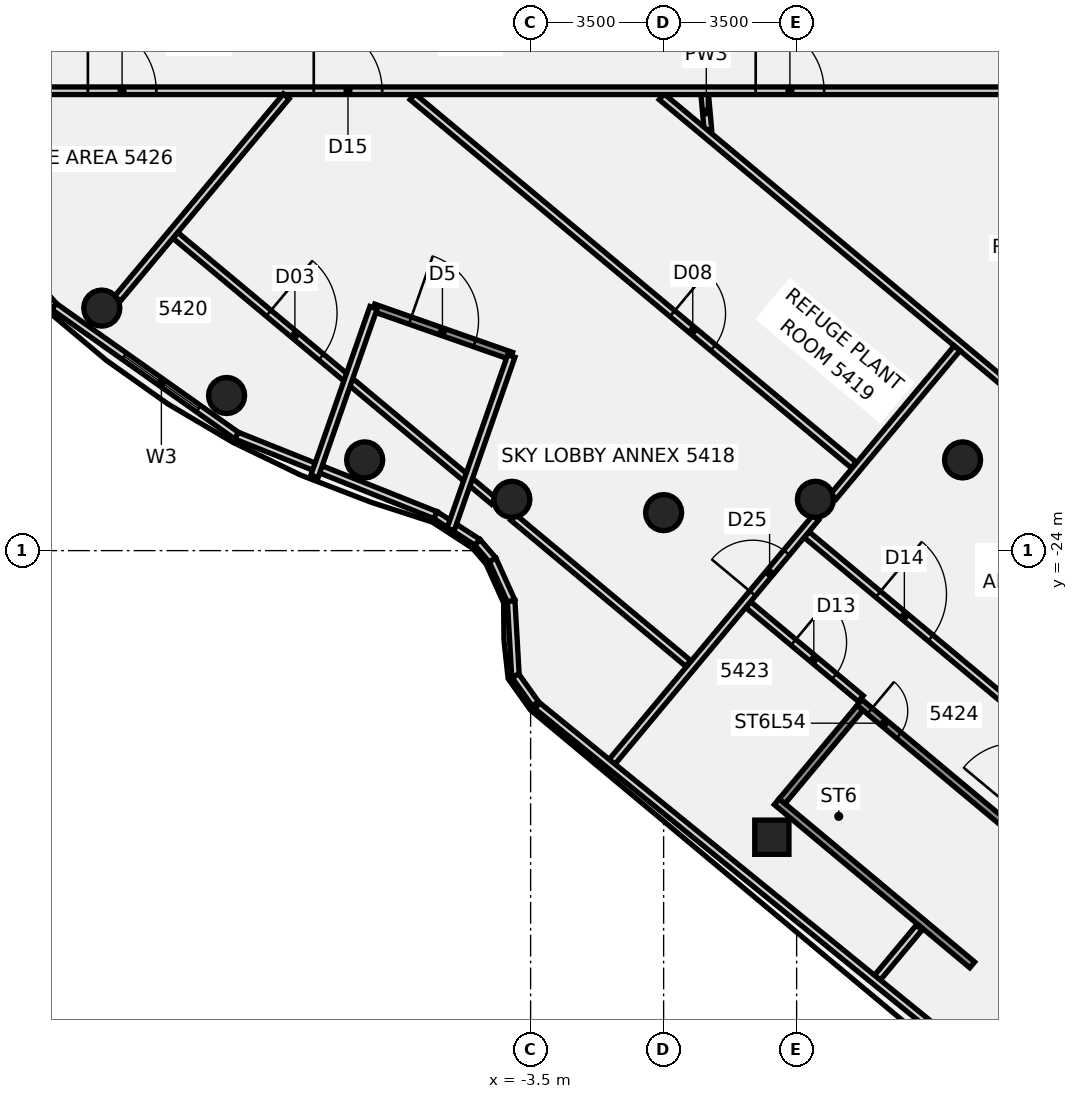
"""IFC4 building model, lengths in metres.
Left out: names, types, materials, properties, quantities, classifications, styles, units other than length and angle.
Written with IfcOpenShell. Run it as: python <this file> out.ifc"""

import sys

from ifc_helpers import new_model, si_unit, direction, frame, frame_2d, origin, origin_2d, place, context, subcontext, project, spatial, polyline, rectangle, circle, outline, extrude, element, fill, save


model = new_model("IFC4")
c1 = context("Model", 3, precision=1e-05, world=origin(), true_north=direction((0.0, 1.0)))
c2 = subcontext(c1, "Body", "Model", "MODEL_VIEW")
j1 = project(units=[si_unit("LENGTHUNIT", "METRE"), si_unit("PLANEANGLEUNIT", "RADIAN")], contexts=[c1])
p1 = place(None, origin())
s1 = spatial("IfcSite", under=j1, at=p1, CompositionType="ELEMENT")
p2 = place(p1, origin())
s2 = spatial("IfcBuilding", under=s1, at=p2, CompositionType="ELEMENT")
p3 = place(p2, frame((0.0, 0.0, 214.9)))
s3 = spatial("IfcBuildingStorey", under=s2, at=p3, CompositionType="ELEMENT", Elevation=214.9)
for number, where, z_axis, x_axis in (
    (1, (-14.784, -17.619, -0.18), (0.0, 0.0, 1.0), (1.0, 0.0, 0.0)),
    (2, (-11.5, -19.919, -0.18), (0.0, 0.0, 1.0), (1.0, 0.0, 0.0)),
    (3, (-7.866, -21.613, -0.18), (0.0, 0.0, 1.0), (1.0, 0.0, 0.0)),
    (4, (-3.994, -22.651, -0.18), (0.0, 0.0, 1.0), (1.0, 0.0, 0.0)),
    (5, (0.0, -23.0, -0.18), (0.0, 0.0, 1.0), (1.0, 0.0, 0.0)),
    (6, (3.994, -22.651, -0.18), (0.0, 0.0, 1.0), (1.0, 0.0, 0.0)),
    (7, (7.866, -21.613, -0.18), (0.0, 0.0, 1.0), (1.0, 0.0, 0.0)),
):
    element("IfcColumn", number, at=place(p3, frame(where, z_axis=z_axis, x_axis=x_axis)), inside=s3, PredefinedType="COLUMN", context=c2, shape_type="SweptSolid", body=[
        extrude(circle(Radius=0.475, at=origin_2d()), origin(), (0.0, 0.0, 1.0), 5.04),
    ])
p4 = place(p3, frame((2.848, -31.541, -0.163), z_axis=(0.0, 0.0, 1.0), x_axis=(0.640774549773, 0.767729103501, 0.0)))
e8 = element("IfcColumn", 8, at=p4, inside=s3, PredefinedType="COLUMN", context=c2, shape_type="SweptSolid", body=[
    extrude(rectangle(XDim=0.9, YDim=0.9, at=origin_2d()), origin(), (0.0, 0.0, 1.0), 4.913),
])
p5 = place(p3, frame((1.081, -11.99, 0.0), z_axis=(0.0, 0.0, 1.0), x_axis=(0.089106826203, -0.996022074818, 0.0)))
e9 = element("IfcWall", 9, at=p5, inside=s3, PredefinedType="PARTITIONING", context=c2, shape_type="SweptSolid", body=[
    extrude(rectangle(XDim=0.94, YDim=0.2, at=frame_2d((0.47, 0.0))), origin(), (0.0, 0.0, 1.0), 4.16),
])
p6 = place(p3, frame((-12.85, -15.703, 0.0), z_axis=(0.0, 0.0, 1.0), x_axis=(0.767726330183, -0.640777872545, 0.0)))
e10 = element("IfcWall", 10, at=p6, inside=s3, PredefinedType="PARTITIONING", context=c2, shape_type="SweptSolid", body=[
    extrude(rectangle(XDim=10.922, YDim=0.2, at=frame_2d((5.461, 0.0))), origin(), (0.0, 0.0, 1.0), 4.16),
])
p7 = place(p6, frame((3.2, 0.0, 0.0)))
e11 = element("IfcOpeningElement", 11, at=p7, cuts=e10, PredefinedType="OPENING", context=c2, shape_type="SweptSolid", body=[
    extrude(rectangle(XDim=1.8, YDim=2.1, at=frame_2d((0.9, 1.05))), frame((0.0, 0.11, 0.0), z_axis=(0.0, -1.0, 0.0), x_axis=(1.0, 0.0, 0.0)), (0.0, 0.0, 1.0), 0.22),
])
p8 = place(p3, frame((-3.957, -23.126, 0.0), z_axis=(0.0, 0.0, 1.0), x_axis=(0.76774384471, -0.640756887524, 0.0)))
e12 = element("IfcWall", 12, at=p8, inside=s3, PredefinedType="PARTITIONING", context=c2, shape_type="SweptSolid", body=[
    extrude(rectangle(XDim=5.997, YDim=0.2, at=frame_2d((2.998, 0.0))), origin(), (0.0, 0.0, 1.0), 4.16),
])
p9 = place(p3, frame((-6.607, -12.057, 0.0), z_axis=(0.0, 0.0, 1.0), x_axis=(0.767718234812, -0.640787571615, 0.0)))
e13 = element("IfcWall", 13, at=p9, inside=s3, PredefinedType="PARTITIONING", context=c2, shape_type="SweptSolid", body=[
    extrude(rectangle(XDim=15.124, YDim=0.2, at=frame_2d((7.562, 0.0))), origin(), (0.0, 0.0, 1.0), 4.16),
])
p10 = place(p9, frame((8.905, 0.0, 0.0)))
e14 = element("IfcOpeningElement", 14, at=p10, cuts=e13, PredefinedType="OPENING", context=c2, shape_type="SweptSolid", body=[
    extrude(rectangle(XDim=1.4, YDim=2.1, at=frame_2d((0.7, 1.05))), frame((0.0, 0.11, 0.0), z_axis=(0.0, -1.0, 0.0), x_axis=(1.0, 0.0, 0.0)), (0.0, 0.0, 1.0), 0.22),
])
p11 = place(p3, frame((-0.052, -12.057, 0.0), z_axis=(0.0, 0.0, 1.0), x_axis=(0.767705248062, -0.64080313053, 0.0)))
e15 = element("IfcWall", 15, at=p11, inside=s3, PredefinedType="PARTITIONING", context=c2, shape_type="SweptSolid", body=[
    extrude(rectangle(XDim=16.257, YDim=0.2, at=frame_2d((8.128, 0.0))), origin(), (0.0, 0.0, 1.0), 4.16),
])
p12 = place(p3, frame((2.225, -25.42, 0.0), z_axis=(0.0, 0.0, 1.0), x_axis=(0.767749314301, -0.640750333898, 0.0)))
e16 = element("IfcWall", 16, at=p12, inside=s3, PredefinedType="PARTITIONING", context=c2, shape_type="SweptSolid", body=[
    extrude(rectangle(XDim=3.86, YDim=0.2, at=frame_2d((1.93, 0.0))), origin(), (0.0, 0.0, 1.0), 4.05),
])
p13 = place(p12, frame((1.55, 0.0, 0.0)))
e17 = element("IfcOpeningElement", 17, at=p13, cuts=e16, PredefinedType="OPENING", context=c2, shape_type="SweptSolid", body=[
    extrude(rectangle(XDim=1.4, YDim=2.1, at=frame_2d((0.7, 1.05))), frame((0.0, 0.11, 0.0), z_axis=(0.0, -1.0, 0.0), x_axis=(1.0, 0.0, 0.0)), (0.0, 0.0, 1.0), 0.22),
])
p14 = place(p3, frame((3.763, -23.578, 0.0), z_axis=(0.0, 0.0, 1.0), x_axis=(0.767756138221, -0.640742157365, 0.0)))
e18 = element("IfcWall", 18, at=p14, inside=s3, PredefinedType="PARTITIONING", context=c2, shape_type="SweptSolid", body=[
    extrude(rectangle(XDim=8.781, YDim=0.2, at=frame_2d((4.39, 0.0))), origin(), (0.0, 0.0, 1.0), 4.05),
])
p15 = place(p14, frame((2.45, 0.0, 0.0)))
e19 = element("IfcOpeningElement", 19, at=p15, cuts=e18, PredefinedType="OPENING", context=c2, shape_type="SweptSolid", body=[
    extrude(rectangle(XDim=1.8, YDim=2.1, at=frame_2d((0.9, 1.05))), frame((0.0, 0.11, 0.0), z_axis=(0.0, -1.0, 0.0), x_axis=(1.0, 0.0, 0.0)), (0.0, 0.0, 1.0), 0.22),
])
p16 = place(p3, frame((-17.1, -11.9, 0.0), z_axis=(0.0, 0.0, 1.0), x_axis=(1.0, 0.0, 0.0)))
e20 = element("IfcWall", 20, at=p16, inside=s3, PredefinedType="PARTITIONING", context=c2, shape_type="SweptSolid", body=[
    extrude(rectangle(XDim=34.145, YDim=0.2, at=frame_2d((17.073, 0.0))), origin(), (0.0, 0.0, 1.0), 4.16),
])
p17 = place(p16, frame((7.894, 0.0, 0.0)))
e21 = element("IfcOpeningElement", 21, at=p17, cuts=e20, PredefinedType="OPENING", context=c2, shape_type="SweptSolid", body=[
    extrude(rectangle(XDim=1.8, YDim=2.1, at=frame_2d((0.9, 1.05))), frame((0.0, 0.11, 0.0), z_axis=(0.0, -1.0, 0.0), x_axis=(1.0, 0.0, 0.0)), (0.0, 0.0, 1.0), 0.22),
])
p18 = place(p16, frame((1.95, 0.0, 0.0)))
e22 = element("IfcOpeningElement", 22, at=p18, cuts=e20, PredefinedType="OPENING", context=c2, shape_type="SweptSolid", body=[
    extrude(rectangle(XDim=1.8, YDim=2.1, at=frame_2d((0.9, 1.05))), frame((0.0, 0.11, 0.0), z_axis=(0.0, -1.0, 0.0), x_axis=(1.0, 0.0, 0.0)), (0.0, 0.0, 1.0), 0.22),
])
p19 = place(p16, frame((19.523, 0.0, 0.0)))
e23 = element("IfcOpeningElement", 23, at=p19, cuts=e20, PredefinedType="OPENING", context=c2, shape_type="SweptSolid", body=[
    extrude(rectangle(XDim=1.8, YDim=2.1, at=frame_2d((0.9, 1.05))), frame((0.0, 0.11, 0.0), z_axis=(0.0, -1.0, 0.0), x_axis=(1.0, 0.0, 0.0)), (0.0, 0.0, 1.0), 0.22),
])
p20 = place(p3, frame((-14.371, -17.37, 0.0), z_axis=(0.0, 0.0, 1.0), x_axis=(0.640582551282, 0.76788931168, 0.0)))
e24 = element("IfcWall", 24, at=p20, inside=s3, PredefinedType="PARTITIONING", context=c2, shape_type="SweptSolid", body=[
    extrude(rectangle(XDim=6.935, YDim=0.2, at=frame_2d((3.467, 0.0))), origin(), (0.0, 0.0, 1.0), 4.16),
])
p21 = place(p3, frame((-1.375, -29.578, 0.0), z_axis=(0.0, 0.0, 1.0), x_axis=(0.6407249457, 0.767770502141, 0.0)))
e25 = element("IfcWall", 25, at=p21, inside=s3, PredefinedType="PARTITIONING", context=c2, shape_type="SweptSolid", body=[
    extrude(rectangle(XDim=8.394, YDim=0.2, at=frame_2d((4.197, 0.0))), origin(), (0.0, 0.0, 1.0), 4.15),
])
p22 = place(p21, frame((5.799, 0.0, 0.0)))
e26 = element("IfcOpeningElement", 26, at=p22, cuts=e25, PredefinedType="OPENING", context=c2, shape_type="SweptSolid", body=[
    extrude(rectangle(XDim=1.4, YDim=2.1, at=frame_2d((0.7, 1.05))), frame((0.0, 0.11, 0.0), z_axis=(0.0, -1.0, 0.0), x_axis=(1.0, 0.0, 0.0)), (0.0, 0.0, 1.0), 0.22),
])
p23 = place(p3, frame((4.461, -22.584, 0.0), z_axis=(0.0, 0.0, 1.0), x_axis=(0.640712685958, 0.767780733057, 0.0)))
e27 = element("IfcWall", 27, at=p23, inside=s3, PredefinedType="PARTITIONING", context=c2, shape_type="SweptSolid", body=[
    extrude(rectangle(XDim=5.09, YDim=0.2, at=frame_2d((2.545, 0.0))), origin(), (0.0, 0.0, 1.0), 4.16),
])
p24 = place(p3, frame((5.535, -35.345, 0.0), z_axis=(0.0, 0.0, 1.0), x_axis=(0.640455669919, 0.767995139873, 0.0)))
e28 = element("IfcWall", 28, at=p24, inside=s3, PredefinedType="PARTITIONING", context=c2, shape_type="SweptSolid", body=[
    extrude(rectangle(XDim=1.859, YDim=0.2, at=frame_2d((0.929, 0.0))), origin(), (0.0, 0.0, 1.0), 4.15),
])
p25 = place(p3, frame((-19.328, -13.853, 0.0), z_axis=(0.0, 0.0, 1.0), x_axis=(0.661797193019, -0.749682916513, 0.0)))
e29 = element("IfcWall", 29, at=p25, inside=s3, PredefinedType="SOLIDWALL", context=c2, shape_type="SweptSolid", body=[
    extrude(rectangle(XDim=4.967, YDim=0.2, at=frame_2d((2.483, 0.0))), origin(), (0.0, 0.0, 1.0), 4.86),
])
p26 = place(p25, frame((2.05, 0.0, 1.4)))
e30 = element("IfcOpeningElement", 30, at=p26, cuts=e29, PredefinedType="OPENING", context=c2, shape_type="SweptSolid", body=[
    extrude(rectangle(XDim=2.4, YDim=2.1, at=frame_2d((1.2, 1.05))), frame((0.0, 0.11, 0.0), z_axis=(0.0, -1.0, 0.0), x_axis=(1.0, 0.0, 0.0)), (0.0, 0.0, 1.0), 0.22),
])
p27 = place(p3, frame((-16.041, -17.576, 0.0), z_axis=(0.0, 0.0, 1.0), x_axis=(0.816353639148, -0.577552366327, 0.0)))
e31 = element("IfcWall", 31, at=p27, inside=s3, PredefinedType="SOLIDWALL", context=c2, shape_type="SweptSolid", body=[
    extrude(rectangle(XDim=5.887, YDim=0.2, at=frame_2d((2.943, 0.0))), origin(), (0.0, 0.0, 1.0), 4.86),
])
p28 = place(p27, frame((2.26, 0.0, 1.4)))
e32 = element("IfcOpeningElement", 32, at=p28, cuts=e31, PredefinedType="OPENING", context=c2, shape_type="SweptSolid", body=[
    extrude(rectangle(XDim=2.4, YDim=2.1, at=frame_2d((1.2, 1.05))), frame((0.0, 0.11, 0.0), z_axis=(0.0, -1.0, 0.0), x_axis=(1.0, 0.0, 0.0)), (0.0, 0.0, 1.0), 0.22),
])
p29 = place(p3, frame((-11.235, -20.976, 0.0), z_axis=(0.0, 0.0, 1.0), x_axis=(0.928649853496, -0.370957476811, 0.0)))
e33 = element("IfcWall", 33, at=p29, inside=s3, PredefinedType="SOLIDWALL", context=c2, shape_type="SweptSolid", body=[
    extrude(rectangle(XDim=5.636, YDim=0.2, at=frame_2d((2.818, 0.0))), origin(), (0.0, 0.0, 1.0), 4.86),
])
p30 = place(p3, frame((-6.001, -23.067, 0.0), z_axis=(0.0, 0.0, 1.0), x_axis=(0.839116919662, -0.543951096274, 0.0)))
e34 = element("IfcWall", 34, at=p30, inside=s3, PredefinedType="SOLIDWALL", context=c2, shape_type="SweptSolid", body=[
    extrude(rectangle(XDim=1.316, YDim=0.2, at=frame_2d((0.658, 0.0))), origin(), (0.0, 0.0, 1.0), 4.86),
])
p31 = place(p3, frame((-4.897, -23.783, 0.0), z_axis=(0.0, 0.0, 1.0), x_axis=(0.651417628254, -0.758719364192, 0.0)))
e35 = element("IfcWall", 35, at=p31, inside=s3, PredefinedType="SOLIDWALL", context=c2, shape_type="SweptSolid", body=[
    extrude(rectangle(XDim=0.61, YDim=0.2, at=frame_2d((0.305, 0.0))), origin(), (0.0, 0.0, 1.0), 4.86),
])
p32 = place(p3, frame((-4.5, -24.246, 0.0), z_axis=(0.0, 0.0, 1.0), x_axis=(0.411322207494, -0.911490011806, 0.0)))
e36 = element("IfcWall", 36, at=p32, inside=s3, PredefinedType="SOLIDWALL", context=c2, shape_type="SweptSolid", body=[
    extrude(rectangle(XDim=1.187, YDim=0.2, at=frame_2d((0.594, 0.0))), origin(), (0.0, 0.0, 1.0), 4.86),
])
p33 = place(p3, frame((-4.011, -25.328, 0.0), z_axis=(0.0, 0.0, 1.0), x_axis=(0.057109766027, -0.998367905446, 0.0)))
e37 = element("IfcWall", 37, at=p33, inside=s3, PredefinedType="SOLIDWALL", context=c2, shape_type="SweptSolid", body=[
    extrude(rectangle(XDim=1.971, YDim=0.2, at=frame_2d((0.985, 0.0))), origin(), (0.0, 0.0, 1.0), 4.86),
])
p34 = place(p3, frame((-3.899, -27.295, 0.0), z_axis=(0.0, 0.0, 1.0), x_axis=(0.580599391883, -0.814189379779, 0.0)))
e38 = element("IfcWall", 38, at=p34, inside=s3, PredefinedType="SOLIDWALL", context=c2, shape_type="SweptSolid", body=[
    extrude(rectangle(XDim=0.904, YDim=0.2, at=frame_2d((0.452, 0.0))), origin(), (0.0, 0.0, 1.0), 4.86),
])
p35 = place(p3, frame((-3.326, -28.081, 0.0), z_axis=(0.0, 0.0, 1.0), x_axis=(0.775707462679, -0.631092649572, 0.0)))
e39 = element("IfcWall", 39, at=p35, inside=s3, PredefinedType="SOLIDWALL", context=c2, shape_type="SweptSolid", body=[
    extrude(rectangle(XDim=19.7, YDim=0.2, at=frame_2d((9.85, 0.0))), origin(), (0.0, 0.0, 1.0), 4.86),
])
p36 = place(p35, frame((17.1, 0.0, 1.4)))
e40 = element("IfcOpeningElement", 40, at=p36, cuts=e39, PredefinedType="OPENING", context=c2, shape_type="SweptSolid", body=[
    extrude(rectangle(XDim=2.4, YDim=2.1, at=frame_2d((1.2, 1.05))), frame((0.0, 0.11, 0.0), z_axis=(0.0, -1.0, 0.0), x_axis=(1.0, 0.0, 0.0)), (0.0, 0.0, 1.0), 0.22),
])
p37 = place(p3, frame((-7.634, -17.608, 0.0), z_axis=(0.0, 0.0, 1.0), x_axis=(0.943849439762, -0.330375899638, 0.0)))
e41 = element("IfcWall", 41, at=p37, inside=s3, PredefinedType="SOLIDWALL", context=c2, shape_type="SweptSolid", body=[
    extrude(rectangle(XDim=3.842, YDim=0.2, at=frame_2d((1.921, 0.0))), origin(), (0.0, 0.0, 1.0), 4.364),
])
p38 = place(p37, frame((1.021, 0.0, 0.0)))
e42 = element("IfcOpeningElement", 42, at=p38, cuts=e41, PredefinedType="OPENING", context=c2, shape_type="SweptSolid", body=[
    extrude(rectangle(XDim=1.8, YDim=2.4, at=frame_2d((0.9, 1.2))), frame((0.0, 0.11, 0.0), z_axis=(0.0, -1.0, 0.0), x_axis=(1.0, 0.0, 0.0)), (0.0, 0.0, 1.0), 0.22),
])
p39 = place(p3, frame((-7.634, -17.608, 0.0), z_axis=(0.0, 0.0, 1.0), x_axis=(-0.330366613527, -0.943852690131, 0.0)))
e43 = element("IfcWall", 43, at=p39, inside=s3, PredefinedType="SOLIDWALL", context=c2, shape_type="SweptSolid", body=[
    extrude(rectangle(XDim=4.702, YDim=0.2, at=frame_2d((2.351, 0.0))), origin(), (0.0, 0.0, 1.0), 4.86),
])
p40 = place(p3, frame((-4.007, -18.878, 0.0), z_axis=(0.0, 0.0, 1.0), x_axis=(-0.330357165554, -0.94385599705, 0.0)))
e44 = element("IfcWall", 44, at=p40, inside=s3, PredefinedType="SOLIDWALL", context=c2, shape_type="SweptSolid", body=[
    extrude(rectangle(XDim=4.84, YDim=0.2, at=frame_2d((2.42, 0.0))), origin(), (0.0, 0.0, 1.0), 4.364),
])
p41 = place(p3, frame((5.155, -27.996, -0.18), z_axis=(0.0, 0.0, 1.0), x_axis=(0.767728232678, -0.640775593129, 0.0)))
e45 = element("IfcWall", 45, at=p41, inside=s3, PredefinedType="SHEAR", context=c2, shape_type="SweptSolid", body=[
    extrude(rectangle(XDim=6.7, YDim=0.2, at=frame_2d((3.35, 0.0))), origin(), (0.0, 0.0, 1.0), 4.23),
])
p42 = place(p41, frame((0.35, 0.0, 0.0)))
e46 = element("IfcOpeningElement", 46, at=p42, cuts=e45, PredefinedType="OPENING", context=c2, shape_type="SweptSolid", body=[
    extrude(rectangle(XDim=1.0, YDim=2.1, at=frame_2d((0.5, 1.05))), frame((0.0, 0.11, 0.0), z_axis=(0.0, -1.0, 0.0), x_axis=(1.0, 0.0, 0.0)), (0.0, 0.0, 1.0), 0.22),
])
p43 = place(p3, frame((2.977, -30.606, -0.18), z_axis=(0.0, 0.0, 1.0), x_axis=(0.767728232678, -0.640775593129, 0.0)))
e47 = element("IfcWall", 47, at=p43, inside=s3, PredefinedType="SHEAR", context=c2, shape_type="SweptSolid", body=[
    extrude(rectangle(XDim=6.7, YDim=0.2, at=frame_2d((3.35, 0.0))), origin(), (0.0, 0.0, 1.0), 4.23),
])
p44 = place(p3, frame((3.117, -30.594, -0.18), z_axis=(0.0, 0.0, 1.0), x_axis=(0.640777035898, 0.767727028485, 0.0)))
e48 = element("IfcWall", 48, at=p44, inside=s3, PredefinedType="SHEAR", context=c2, shape_type="SweptSolid", body=[
    extrude(rectangle(XDim=3.2, YDim=0.2, at=frame_2d((1.6, 0.0))), origin(), (0.0, 0.0, 1.0), 4.23),
])
p45 = place(p3, frame((0.0, 0.0, -0.18)))
e49 = element("IfcWall", 49, at=p45, inside=s3, PredefinedType="SHEAR", context=c2, shape_type="SweptSolid", body=[
    extrude(outline(polyline([(8.031, -34.695), (8.185, -34.823), (10.235, -32.366), (10.081, -32.238), (8.031, -34.695)])), origin(), (0.0, 0.0, 1.0), 4.23),
])
p46 = place(p7, frame((1.8, 0.0, 0.0), z_axis=(0.0, 0.0, 1.0), x_axis=(-1.0, 0.0, 0.0)))
e50 = element("IfcDoor", 50, at=p46, inside=s3, OperationType="DOUBLE_DOOR_SINGLE_SWING", PredefinedType="DOOR", context=c2, shape_type="SweptSolid", body=[
    extrude(rectangle(XDim=1.8, YDim=2.1, at=frame_2d((0.9, 1.05))), frame((0.0, 0.025, 0.0), z_axis=(0.0, -1.0, 0.0), x_axis=(1.0, 0.0, 0.0)), (0.0, 0.0, 1.0), 0.05),
])
fill(e11, e50)
p47 = place(p10, origin())
e51 = element("IfcDoor", 51, at=p47, inside=s3, OperationType="DOUBLE_DOOR_SINGLE_SWING", PredefinedType="DOOR", context=c2, shape_type="SweptSolid", body=[
    extrude(rectangle(XDim=1.4, YDim=2.1, at=frame_2d((0.7, 1.05))), frame((0.0, 0.025, 0.0), z_axis=(0.0, -1.0, 0.0), x_axis=(1.0, 0.0, 0.0)), (0.0, 0.0, 1.0), 0.05),
])
fill(e14, e51)
p48 = place(p13, frame((1.4, 0.0, 0.0), z_axis=(0.0, 0.0, 1.0), x_axis=(-1.0, 0.0, 0.0)))
e52 = element("IfcDoor", 52, at=p48, inside=s3, OperationType="DOUBLE_DOOR_SINGLE_SWING", PredefinedType="DOOR", context=c2, shape_type="SweptSolid", body=[
    extrude(rectangle(XDim=1.4, YDim=2.1, at=frame_2d((0.7, 1.05))), frame((0.0, 0.025, 0.0), z_axis=(0.0, -1.0, 0.0), x_axis=(1.0, 0.0, 0.0)), (0.0, 0.0, 1.0), 0.05),
])
fill(e17, e52)
p49 = place(p15, origin())
e53 = element("IfcDoor", 53, at=p49, inside=s3, OperationType="DOUBLE_DOOR_SINGLE_SWING", PredefinedType="DOOR", context=c2, shape_type="SweptSolid", body=[
    extrude(rectangle(XDim=1.8, YDim=2.1, at=frame_2d((0.9, 1.05))), frame((0.0, 0.025, 0.0), z_axis=(0.0, -1.0, 0.0), x_axis=(1.0, 0.0, 0.0)), (0.0, 0.0, 1.0), 0.05),
])
fill(e19, e53)
p50 = place(p17, origin())
e54 = element("IfcDoor", 54, at=p50, inside=s3, OperationType="DOUBLE_DOOR_SINGLE_SWING", PredefinedType="DOOR", context=c2, shape_type="SweptSolid", body=[
    extrude(rectangle(XDim=1.8, YDim=2.1, at=frame_2d((0.9, 1.05))), frame((0.0, 0.025, 0.0), z_axis=(0.0, -1.0, 0.0), x_axis=(1.0, 0.0, 0.0)), (0.0, 0.0, 1.0), 0.05),
])
fill(e21, e54)
p51 = place(p18, frame((1.8, 0.0, 0.0), z_axis=(0.0, 0.0, 1.0), x_axis=(-1.0, 0.0, 0.0)))
e55 = element("IfcDoor", 55, at=p51, inside=s3, OperationType="DOUBLE_DOOR_SINGLE_SWING", PredefinedType="DOOR", context=c2, shape_type="SweptSolid", body=[
    extrude(rectangle(XDim=1.8, YDim=2.1, at=frame_2d((0.9, 1.05))), frame((0.0, 0.025, 0.0), z_axis=(0.0, -1.0, 0.0), x_axis=(1.0, 0.0, 0.0)), (0.0, 0.0, 1.0), 0.05),
])
fill(e22, e55)
p52 = place(p19, frame((1.8, 0.0, 0.0), z_axis=(0.0, 0.0, 1.0), x_axis=(-1.0, 0.0, 0.0)))
e56 = element("IfcDoor", 56, at=p52, inside=s3, OperationType="DOUBLE_DOOR_SINGLE_SWING", PredefinedType="DOOR", context=c2, shape_type="SweptSolid", body=[
    extrude(rectangle(XDim=1.8, YDim=2.1, at=frame_2d((0.9, 1.05))), frame((0.0, 0.025, 0.0), z_axis=(0.0, -1.0, 0.0), x_axis=(1.0, 0.0, 0.0)), (0.0, 0.0, 1.0), 0.05),
])
fill(e23, e56)
p53 = place(p22, origin())
e57 = element("IfcDoor", 57, at=p53, inside=s3, OperationType="DOUBLE_DOOR_SINGLE_SWING", PredefinedType="DOOR", context=c2, shape_type="SweptSolid", body=[
    extrude(rectangle(XDim=1.4, YDim=2.1, at=frame_2d((0.7, 1.05))), frame((0.0, 0.025, 0.0), z_axis=(0.0, -1.0, 0.0), x_axis=(1.0, 0.0, 0.0)), (0.0, 0.0, 1.0), 0.05),
])
fill(e26, e57)
p54 = place(p28, origin())
e58 = element("IfcWindow", 58, at=p54, inside=s3, PartitioningType="SINGLE_PANEL", PredefinedType="WINDOW", context=c2, shape_type="SweptSolid", body=[
    extrude(rectangle(XDim=2.4, YDim=2.1, at=frame_2d((1.2, 1.05))), frame((0.0, 0.03, 0.0), z_axis=(0.0, -1.0, 0.0), x_axis=(1.0, 0.0, 0.0)), (0.0, 0.0, 1.0), 0.06),
])
fill(e32, e58)
p55 = place(p38, origin())
e59 = element("IfcDoor", 59, at=p55, inside=s3, OperationType="SINGLE_SWING_LEFT", PredefinedType="DOOR", context=c2, shape_type="SweptSolid", body=[
    extrude(rectangle(XDim=1.8, YDim=2.4, at=frame_2d((0.9, 1.2))), frame((0.0, 0.025, 0.0), z_axis=(0.0, -1.0, 0.0), x_axis=(1.0, 0.0, 0.0)), (0.0, 0.0, 1.0), 0.05),
])
fill(e42, e59)
p56 = place(p42, origin())
e60 = element("IfcDoor", 60, at=p56, inside=s3, OperationType="SINGLE_SWING_LEFT", PredefinedType="DOOR", context=c2, shape_type="SweptSolid", body=[
    extrude(rectangle(XDim=1.0, YDim=2.1, at=frame_2d((0.5, 1.05))), frame((0.0, 0.025, 0.0), z_axis=(0.0, -1.0, 0.0), x_axis=(1.0, 0.0, 0.0)), (0.0, 0.0, 1.0), 0.05),
])
fill(e46, e60)
save(model, sys.argv[1])
